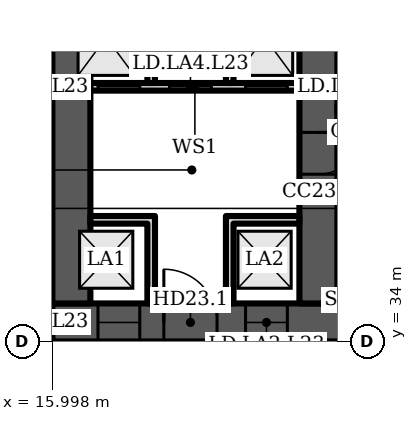
"""IFC4 building model, lengths in metres.
Left out: names, types, materials, properties, quantities, classifications, styles, units other than length and angle.
Written with IfcOpenShell. Run it as: python <this file> out.ifc"""

import sys

from ifc_helpers import new_model, si_unit, direction, frame, frame_2d, origin, place, context, subcontext, project, spatial, polyline, rectangle, outline, extrude, element, fill, save


model = new_model("IFC4")
c1 = context("Model", 3, precision=1e-05, world=origin(), true_north=direction((0.0, 1.0)))
c2 = subcontext(c1, "Body", "Model", "MODEL_VIEW")
j1 = project(units=[si_unit("LENGTHUNIT", "METRE"), si_unit("PLANEANGLEUNIT", "RADIAN")], contexts=[c1])
p1 = place(None, origin())
s1 = spatial("IfcSite", under=j1, at=p1, CompositionType="ELEMENT")
p2 = place(p1, origin())
s2 = spatial("IfcBuilding", under=s1, at=p2, CompositionType="ELEMENT")
p3 = place(p2, frame((0.0, 0.0, 103.9)))
s3 = spatial("IfcBuildingStorey", under=s2, at=p3, CompositionType="ELEMENT", Elevation=103.9)
p4 = place(p3, frame((16.0, 34.5, 0.0), z_axis=(0.0, 0.0, 1.0), x_axis=(1.0, 0.0, 0.0)))
e1 = element("IfcWall", 1, at=p4, inside=s3, PredefinedType="SHEAR", context=c2, shape_type="SweptSolid", body=[
    extrude(rectangle(XDim=49.0, YDim=1.0, at=frame_2d((24.5, 0.0))), origin(), (0.0, 0.0, 1.0), 3.6),
])
p5 = place(p4, frame((1.2, 0.0, 0.0)))
e2 = element("IfcOpeningElement", 2, at=p5, cuts=e1, PredefinedType="OPENING", context=c2, shape_type="SweptSolid", body=[
    extrude(rectangle(XDim=1.1, YDim=2.1, at=frame_2d((0.55, 1.05))), frame((0.0, 0.51, 0.0), z_axis=(0.0, -1.0, 0.0), x_axis=(1.0, 0.0, 0.0)), (0.0, 0.0, 1.0), 1.02),
])
p6 = place(p4, frame((5.083, 0.0, 0.0)))
e3 = element("IfcOpeningElement", 3, at=p6, cuts=e1, PredefinedType="OPENING", context=c2, shape_type="SweptSolid", body=[
    extrude(rectangle(XDim=1.1, YDim=2.1, at=frame_2d((0.55, 1.05))), frame((0.0, 0.51, 0.0), z_axis=(0.0, -1.0, 0.0), x_axis=(1.0, 0.0, 0.0)), (0.0, 0.0, 1.0), 1.02),
])
p7 = place(p4, frame((2.933, 0.0, 0.0)))
e4 = element("IfcOpeningElement", 4, at=p7, cuts=e1, PredefinedType="OPENING", context=c2, shape_type="SweptSolid", body=[
    extrude(rectangle(XDim=1.4, YDim=2.1, at=frame_2d((0.7, 1.05))), frame((0.0, 0.51, 0.0), z_axis=(0.0, -1.0, 0.0), x_axis=(1.0, 0.0, 0.0)), (0.0, 0.0, 1.0), 1.02),
])
p8 = place(p4, frame((7.65, 0.0, 0.0)))
e5 = element("IfcOpeningElement", 5, at=p8, cuts=e1, PredefinedType="OPENING", context=c2, shape_type="SweptSolid", body=[
    extrude(rectangle(XDim=1.2, YDim=2.1, at=frame_2d((0.6, 1.05))), frame((0.0, 0.51, 0.0), z_axis=(0.0, -1.0, 0.0), x_axis=(1.0, 0.0, 0.0)), (0.0, 0.0, 1.0), 1.02),
])
p9 = place(p4, frame((14.817, 0.0, 0.0)))
e6 = element("IfcOpeningElement", 6, at=p9, cuts=e1, PredefinedType="OPENING", context=c2, shape_type="SweptSolid", body=[
    extrude(rectangle(XDim=1.1, YDim=2.1, at=frame_2d((0.55, 1.05))), frame((0.0, 0.51, 0.0), z_axis=(0.0, -1.0, 0.0), x_axis=(1.0, 0.0, 0.0)), (0.0, 0.0, 1.0), 1.02),
])
p10 = place(p4, frame((19.083, 0.0, 0.0)))
e7 = element("IfcOpeningElement", 7, at=p10, cuts=e1, PredefinedType="OPENING", context=c2, shape_type="SweptSolid", body=[
    extrude(rectangle(XDim=1.1, YDim=2.1, at=frame_2d((0.55, 1.05))), frame((0.0, 0.51, 0.0), z_axis=(0.0, -1.0, 0.0), x_axis=(1.0, 0.0, 0.0)), (0.0, 0.0, 1.0), 1.02),
])
p11 = place(p4, frame((16.8, 0.0, 0.0)))
e8 = element("IfcOpeningElement", 8, at=p11, cuts=e1, PredefinedType="OPENING", context=c2, shape_type="SweptSolid", body=[
    extrude(rectangle(XDim=1.4, YDim=2.1, at=frame_2d((0.7, 1.05))), frame((0.0, 0.51, 0.0), z_axis=(0.0, -1.0, 0.0), x_axis=(1.0, 0.0, 0.0)), (0.0, 0.0, 1.0), 1.02),
])
p12 = place(p4, frame((21.817, 0.0, 0.0)))
e9 = element("IfcOpeningElement", 9, at=p12, cuts=e1, PredefinedType="OPENING", context=c2, shape_type="SweptSolid", body=[
    extrude(rectangle(XDim=1.1, YDim=2.1, at=frame_2d((0.55, 1.05))), frame((0.0, 0.51, 0.0), z_axis=(0.0, -1.0, 0.0), x_axis=(1.0, 0.0, 0.0)), (0.0, 0.0, 1.0), 1.02),
])
p13 = place(p4, frame((26.083, 0.0, 0.0)))
e10 = element("IfcOpeningElement", 10, at=p13, cuts=e1, PredefinedType="OPENING", context=c2, shape_type="SweptSolid", body=[
    extrude(rectangle(XDim=1.1, YDim=2.1, at=frame_2d((0.55, 1.05))), frame((0.0, 0.51, 0.0), z_axis=(0.0, -1.0, 0.0), x_axis=(1.0, 0.0, 0.0)), (0.0, 0.0, 1.0), 1.02),
])
p14 = place(p4, frame((33.15, 0.0, 0.0)))
e11 = element("IfcOpeningElement", 11, at=p14, cuts=e1, PredefinedType="OPENING", context=c2, shape_type="SweptSolid", body=[
    extrude(rectangle(XDim=1.2, YDim=2.1, at=frame_2d((0.6, 1.05))), frame((0.0, 0.51, 0.0), z_axis=(0.0, -1.0, 0.0), x_axis=(1.0, 0.0, 0.0)), (0.0, 0.0, 1.0), 1.02),
])
p15 = place(p4, frame((37.8, 0.0, 0.0)))
e12 = element("IfcOpeningElement", 12, at=p15, cuts=e1, PredefinedType="OPENING", context=c2, shape_type="SweptSolid", body=[
    extrude(rectangle(XDim=1.4, YDim=2.1, at=frame_2d((0.7, 1.05))), frame((0.0, 0.51, 0.0), z_axis=(0.0, -1.0, 0.0), x_axis=(1.0, 0.0, 0.0)), (0.0, 0.0, 1.0), 1.02),
])
p16 = place(p4, frame((42.817, 0.0, 0.0)))
e13 = element("IfcOpeningElement", 13, at=p16, cuts=e1, PredefinedType="OPENING", context=c2, shape_type="SweptSolid", body=[
    extrude(rectangle(XDim=1.1, YDim=2.1, at=frame_2d((0.55, 1.05))), frame((0.0, 0.51, 0.0), z_axis=(0.0, -1.0, 0.0), x_axis=(1.0, 0.0, 0.0)), (0.0, 0.0, 1.0), 1.02),
])
p17 = place(p4, frame((46.7, 0.0, 0.0)))
e14 = element("IfcOpeningElement", 14, at=p17, cuts=e1, PredefinedType="OPENING", context=c2, shape_type="SweptSolid", body=[
    extrude(rectangle(XDim=1.1, YDim=2.1, at=frame_2d((0.55, 1.05))), frame((0.0, 0.51, 0.0), z_axis=(0.0, -1.0, 0.0), x_axis=(1.0, 0.0, 0.0)), (0.0, 0.0, 1.0), 1.02),
])
p18 = place(p4, frame((44.667, 0.0, 0.0)))
e15 = element("IfcOpeningElement", 15, at=p18, cuts=e1, PredefinedType="OPENING", context=c2, shape_type="SweptSolid", body=[
    extrude(rectangle(XDim=1.4, YDim=2.1, at=frame_2d((0.7, 1.05))), frame((0.0, 0.51, 0.0), z_axis=(0.0, -1.0, 0.0), x_axis=(1.0, 0.0, 0.0)), (0.0, 0.0, 1.0), 1.02),
])
p19 = place(p3, frame((16.5, 35.0, 0.0), z_axis=(0.0, 0.0, 1.0), x_axis=(0.0, 1.0, 0.0)))
e16 = element("IfcWall", 16, at=p19, inside=s3, PredefinedType="SHEAR", context=c2, shape_type="SweptSolid", body=[
    extrude(rectangle(XDim=12.784, YDim=1.0, at=frame_2d((6.392, 0.0))), origin(), (0.0, 0.0, 1.0), 3.6),
])
p20 = place(p3, frame((23.0, 35.0, 0.0), z_axis=(0.0, 0.0, 1.0), x_axis=(0.0, 1.0, 0.0)))
e17 = element("IfcWall", 17, at=p20, inside=s3, PredefinedType="SHEAR", context=c2, shape_type="SweptSolid", body=[
    extrude(rectangle(XDim=13.352, YDim=1.0, at=frame_2d((6.676, 0.0))), origin(), (0.0, 0.0, 1.0), 3.6),
])
p21 = place(p20, frame((10.426, 0.0, 0.0)))
e18 = element("IfcOpeningElement", 18, at=p21, cuts=e17, PredefinedType="OPENING", context=c2, shape_type="SweptSolid", body=[
    extrude(rectangle(XDim=1.0, YDim=2.1, at=frame_2d((0.5, 1.05))), frame((0.0, 0.51, 0.0), z_axis=(0.0, -1.0, 0.0), x_axis=(1.0, 0.0, 0.0)), (0.0, 0.0, 1.0), 1.02),
])
p22 = place(p20, frame((3.4, 0.0, 0.0)))
e19 = element("IfcOpeningElement", 19, at=p22, cuts=e17, PredefinedType="OPENING", context=c2, shape_type="SweptSolid", body=[
    extrude(rectangle(XDim=1.1, YDim=2.1, at=frame_2d((0.55, 1.05))), frame((0.0, 0.51, 0.0), z_axis=(0.0, -1.0, 0.0), x_axis=(1.0, 0.0, 0.0)), (0.0, 0.0, 1.0), 1.02),
])
p23 = place(p3, frame((17.0, 40.7, 0.0), z_axis=(0.0, 0.0, 1.0), x_axis=(1.0, 0.0, 0.0)))
e20 = element("IfcWall", 20, at=p23, inside=s3, PredefinedType="PARTITIONING", context=c2, shape_type="SweptSolid", body=[
    extrude(rectangle(XDim=5.5, YDim=0.2, at=frame_2d((2.75, 0.0))), origin(), (0.0, 0.0, 1.0), 3.2),
])
p24 = place(p23, frame((0.2, 0.0, 0.0)))
e21 = element("IfcOpeningElement", 21, at=p24, cuts=e20, PredefinedType="OPENING", context=c2, shape_type="SweptSolid", body=[
    extrude(rectangle(XDim=1.1, YDim=2.1, at=frame_2d((0.55, 1.05))), frame((0.0, 0.11, 0.0), z_axis=(0.0, -1.0, 0.0), x_axis=(1.0, 0.0, 0.0)), (0.0, 0.0, 1.0), 0.22),
])
p25 = place(p23, frame((2.083, 0.0, 0.0)))
e22 = element("IfcOpeningElement", 22, at=p25, cuts=e20, PredefinedType="OPENING", context=c2, shape_type="SweptSolid", body=[
    extrude(rectangle(XDim=1.1, YDim=2.1, at=frame_2d((0.55, 1.05))), frame((0.0, 0.11, 0.0), z_axis=(0.0, -1.0, 0.0), x_axis=(1.0, 0.0, 0.0)), (0.0, 0.0, 1.0), 0.22),
])
p26 = place(p23, frame((4.083, 0.0, 0.0)))
e23 = element("IfcOpeningElement", 23, at=p26, cuts=e20, PredefinedType="OPENING", context=c2, shape_type="SweptSolid", body=[
    extrude(rectangle(XDim=1.1, YDim=2.1, at=frame_2d((0.55, 1.05))), frame((0.0, 0.11, 0.0), z_axis=(0.0, -1.0, 0.0), x_axis=(1.0, 0.0, 0.0)), (0.0, 0.0, 1.0), 0.22),
])
p27 = place(p3, origin())
e24 = element("IfcWall", 24, at=p27, inside=s3, PredefinedType="PARTITIONING", context=c2, shape_type="SweptSolid", body=[
    extrude(outline(polyline([(18.5, 37.1), (17.0, 37.1), (17.0, 37.3), (18.5, 37.3), (18.7, 37.3), (18.7, 35.0), (18.5, 35.0), (18.5, 37.1)])), origin(), (0.0, 0.0, 1.0), 3.2),
])
p28 = place(p3, origin())
e25 = element("IfcWall", 25, at=p28, inside=s3, PredefinedType="PARTITIONING", context=c2, shape_type="SweptSolid", body=[
    extrude(outline(polyline([(20.567, 37.3), (20.767, 37.3), (22.5, 37.3), (22.5, 37.1), (20.767, 37.1), (20.767, 35.0), (20.567, 35.0), (20.567, 37.3)])), origin(), (0.0, 0.0, 1.0), 3.2),
])
p29 = place(p3, origin())
e26 = element("IfcWall", 26, at=p29, inside=s3, PredefinedType="PARTITIONING", context=c2, shape_type="SweptSolid", body=[
    extrude(outline(polyline([(18.7, 40.8), (18.5, 40.8), (18.5, 43.8), (17.0, 43.8), (17.0, 44.0), (22.5, 44.0), (22.5, 43.8), (20.767, 43.8), (20.767, 40.8), (20.567, 40.8), (20.567, 43.8), (18.7, 43.8), (18.7, 40.8)])), origin(), (0.0, 0.0, 1.0), 3.2),
])
p30 = place(p5, origin())
e27 = element("IfcDoor", 27, at=p30, inside=s3, OperationType="DOUBLE_DOOR_SLIDING", PredefinedType="DOOR", context=c2, shape_type="SweptSolid", body=[
    extrude(rectangle(XDim=1.1, YDim=2.1, at=frame_2d((0.55, 1.05))), frame((0.0, 0.025, 0.0), z_axis=(0.0, -1.0, 0.0), x_axis=(1.0, 0.0, 0.0)), (0.0, 0.0, 1.0), 0.05),
])
fill(e2, e27)
p31 = place(p6, origin())
e28 = element("IfcDoor", 28, at=p31, inside=s3, OperationType="DOUBLE_DOOR_SLIDING", PredefinedType="DOOR", context=c2, shape_type="SweptSolid", body=[
    extrude(rectangle(XDim=1.1, YDim=2.1, at=frame_2d((0.55, 1.05))), frame((0.0, 0.025, 0.0), z_axis=(0.0, -1.0, 0.0), x_axis=(1.0, 0.0, 0.0)), (0.0, 0.0, 1.0), 0.05),
])
fill(e3, e28)
p32 = place(p7, origin())
e29 = element("IfcDoor", 29, at=p32, inside=s3, OperationType="DOUBLE_DOOR_SINGLE_SWING", PredefinedType="DOOR", context=c2, shape_type="SweptSolid", body=[
    extrude(rectangle(XDim=1.4, YDim=2.1, at=frame_2d((0.7, 1.05))), frame((0.0, 0.025, 0.0), z_axis=(0.0, -1.0, 0.0), x_axis=(1.0, 0.0, 0.0)), (0.0, 0.0, 1.0), 0.05),
])
fill(e4, e29)
p33 = place(p24, origin())
e30 = element("IfcDoor", 30, at=p33, inside=s3, OperationType="DOUBLE_DOOR_SLIDING", PredefinedType="DOOR", context=c2, shape_type="SweptSolid", body=[
    extrude(rectangle(XDim=1.1, YDim=2.1, at=frame_2d((0.55, 1.05))), frame((0.0, 0.025, 0.0), z_axis=(0.0, -1.0, 0.0), x_axis=(1.0, 0.0, 0.0)), (0.0, 0.0, 1.0), 0.05),
])
fill(e21, e30)
p34 = place(p25, origin())
e31 = element("IfcDoor", 31, at=p34, inside=s3, OperationType="DOUBLE_DOOR_SLIDING", PredefinedType="DOOR", context=c2, shape_type="SweptSolid", body=[
    extrude(rectangle(XDim=1.1, YDim=2.1, at=frame_2d((0.55, 1.05))), frame((0.0, 0.025, 0.0), z_axis=(0.0, -1.0, 0.0), x_axis=(1.0, 0.0, 0.0)), (0.0, 0.0, 1.0), 0.05),
])
fill(e22, e31)
p35 = place(p26, origin())
e32 = element("IfcDoor", 32, at=p35, inside=s3, OperationType="DOUBLE_DOOR_SLIDING", PredefinedType="DOOR", context=c2, shape_type="SweptSolid", body=[
    extrude(rectangle(XDim=1.1, YDim=2.1, at=frame_2d((0.55, 1.05))), frame((0.0, 0.025, 0.0), z_axis=(0.0, -1.0, 0.0), x_axis=(1.0, 0.0, 0.0)), (0.0, 0.0, 1.0), 0.05),
])
fill(e23, e32)
p36 = place(p22, origin())
e33 = element("IfcDoor", 33, at=p36, inside=s3, OperationType="SINGLE_SWING_RIGHT", PredefinedType="DOOR", context=c2, shape_type="SweptSolid", body=[
    extrude(rectangle(XDim=1.1, YDim=2.1, at=frame_2d((0.55, 1.05))), frame((0.0, 0.025, 0.0), z_axis=(0.0, -1.0, 0.0), x_axis=(1.0, 0.0, 0.0)), (0.0, 0.0, 1.0), 0.05),
])
fill(e19, e33)
save(model, sys.argv[1])
